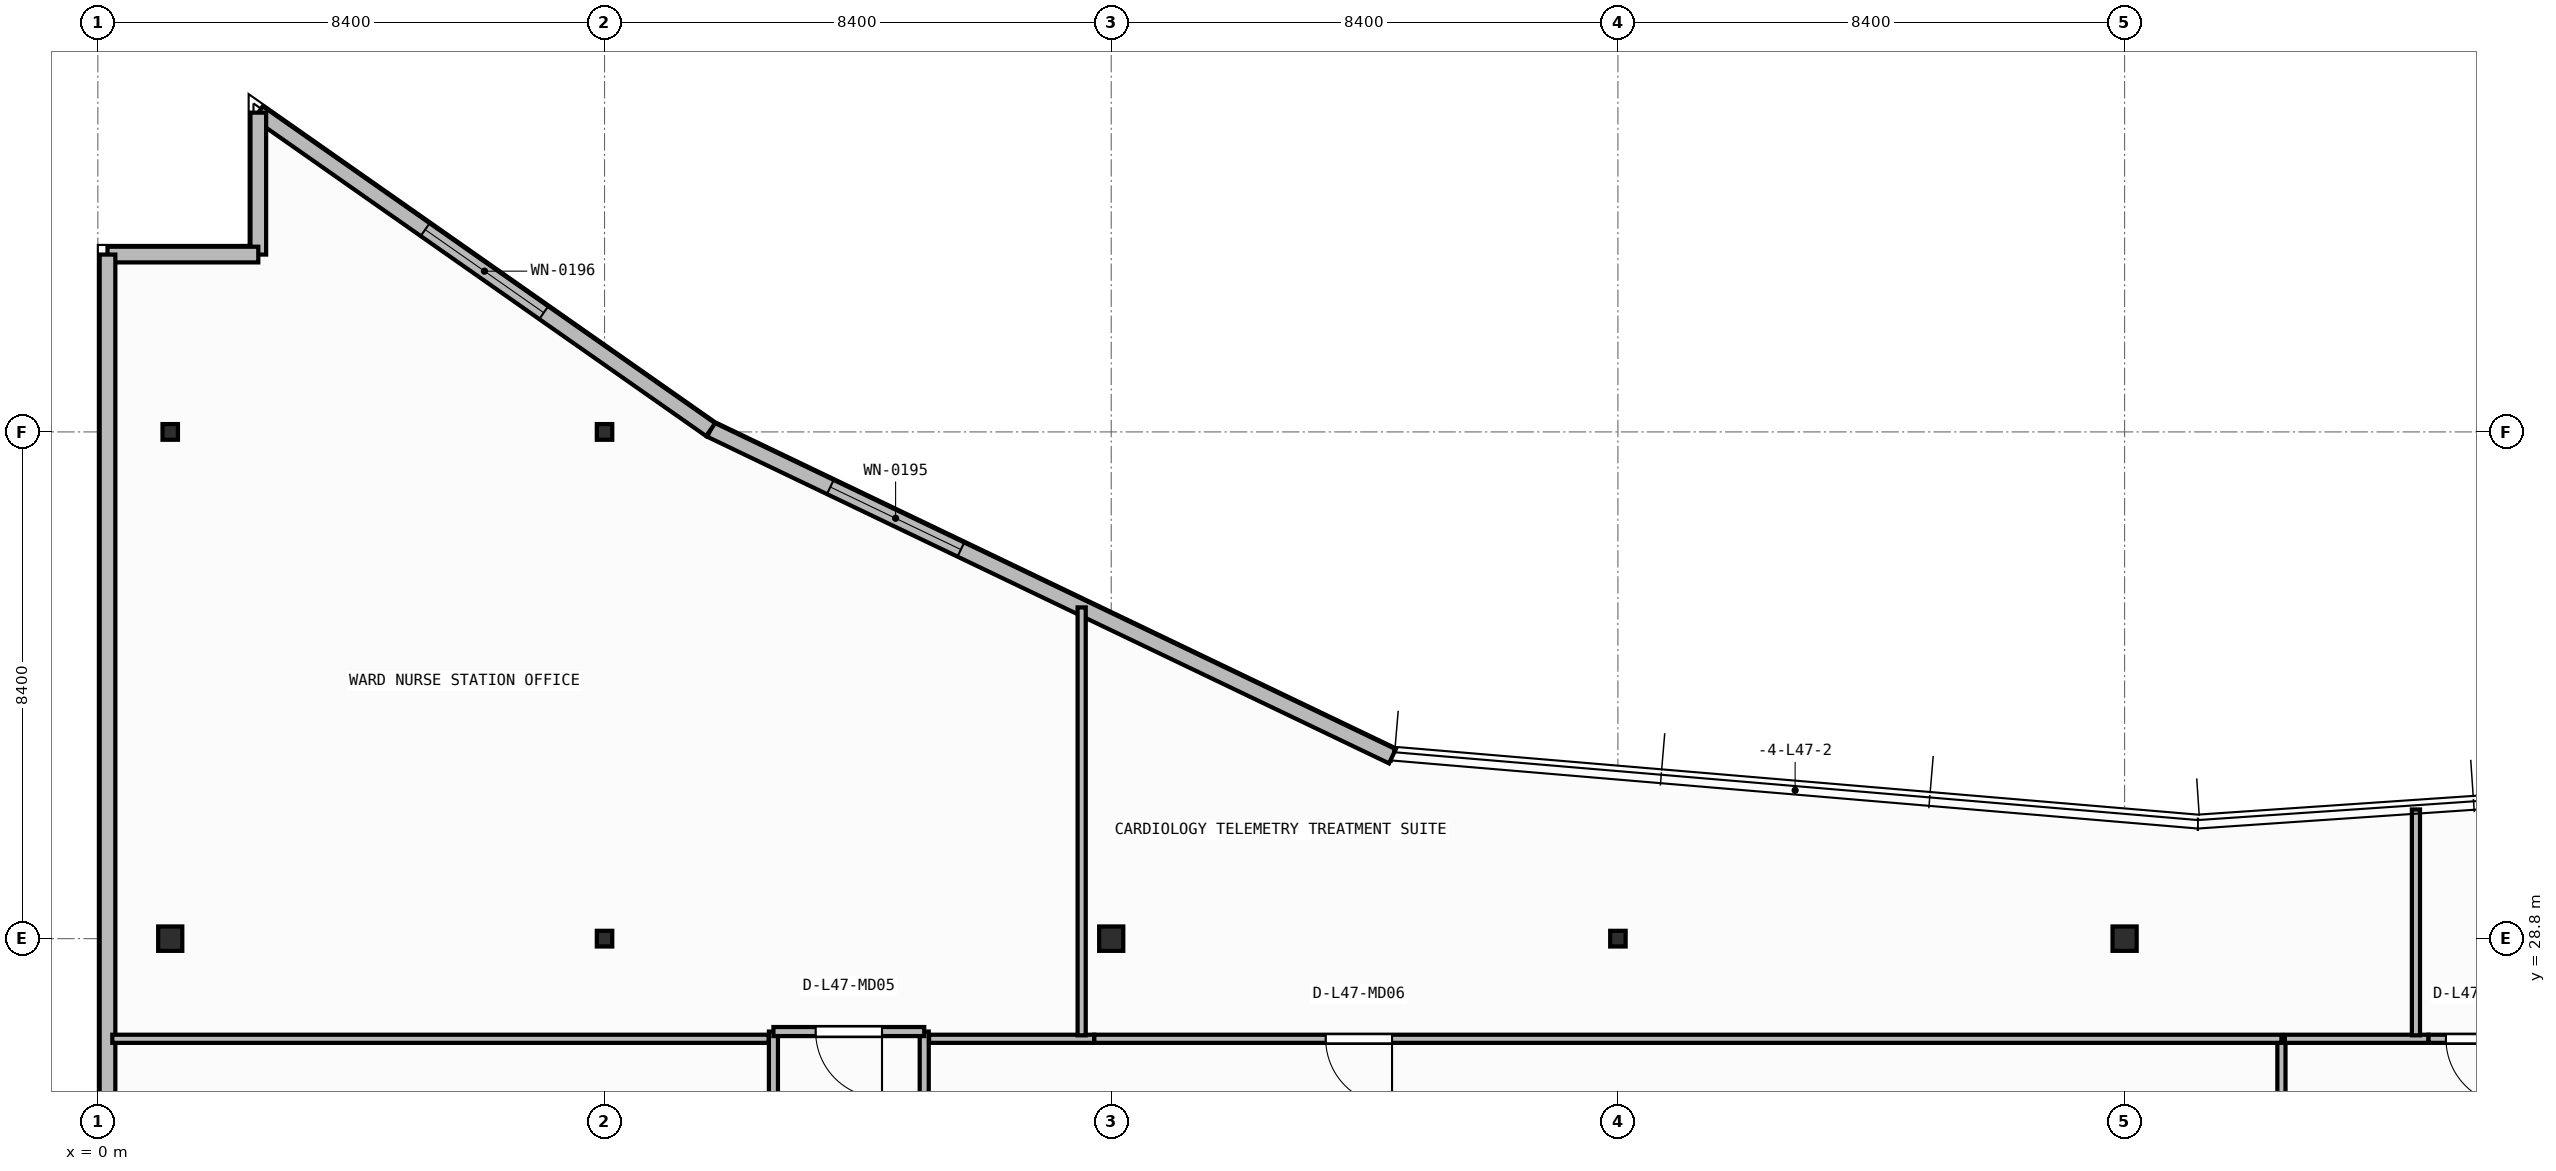
"""IFC4 building model, lengths in metres.
Left out: names, types, materials, properties, quantities, classifications, styles, units other than length and angle.
Written with IfcOpenShell. Run it as: python <this file> out.ifc"""

import sys

from ifc_helpers import new_model, si_unit, direction, frame, frame_2d, origin, origin_2d, place, context, subcontext, project, spatial, rectangle, i_section, extrude, element, fill, save


model = new_model("IFC4")
c1 = context("Model", 3, precision=1e-05, world=origin(), true_north=direction((0.0, 1.0)))
c2 = subcontext(c1, "Body", "Model", "MODEL_VIEW")
j1 = project(units=[si_unit("LENGTHUNIT", "METRE"), si_unit("PLANEANGLEUNIT", "RADIAN")], contexts=[c1])
p1 = place(None, origin())
s1 = spatial("IfcSite", under=j1, at=p1, CompositionType="ELEMENT")
p2 = place(p1, origin())
s2 = spatial("IfcBuilding", under=s1, at=p2, CompositionType="ELEMENT")
p3 = place(p2, frame((0.0, 0.0, 192.1)))
s3 = spatial("IfcBuildingStorey", under=s2, at=p3, CompositionType="ELEMENT", Elevation=192.1)
p4 = place(p3, frame((1.2, 28.8, 0.0), z_axis=(0.0, 0.0, 1.0), x_axis=(1.0, 0.0, 0.0)))
e1 = element("IfcColumn", 1, at=p4, inside=s3, PredefinedType="COLUMN", context=c2, shape_type="SweptSolid", body=[
    extrude(i_section(OverallWidth=0.4, OverallDepth=0.404, WebThickness=0.02, FlangeThickness=0.032, at=origin_2d()), origin(), (0.0, 0.0, 1.0), 3.95),
])
p5 = place(p3, frame((8.4, 28.8, 0.0), z_axis=(0.0, 0.0, 1.0), x_axis=(1.0, 0.0, 0.0)))
e2 = element("IfcColumn", 2, at=p5, inside=s3, PredefinedType="COLUMN", context=c2, shape_type="SweptSolid", body=[
    extrude(i_section(OverallWidth=0.256, OverallDepth=0.26, WebThickness=0.01, FlangeThickness=0.017, FilletRadius=0.013, at=origin_2d()), origin(), (0.0, 0.0, 1.0), 3.95),
])
p6 = place(p3, frame((16.8, 28.8, 0.0), z_axis=(0.0, 0.0, 1.0), x_axis=(1.0, 0.0, 0.0)))
e3 = element("IfcColumn", 3, at=p6, inside=s3, PredefinedType="COLUMN", context=c2, shape_type="SweptSolid", body=[
    extrude(i_section(OverallWidth=0.4, OverallDepth=0.404, WebThickness=0.02, FlangeThickness=0.032, at=origin_2d()), origin(), (0.0, 0.0, 1.0), 3.95),
])
p7 = place(p3, frame((25.2, 28.8, 0.0), z_axis=(0.0, 0.0, 1.0), x_axis=(1.0, 0.0, 0.0)))
e4 = element("IfcColumn", 4, at=p7, inside=s3, PredefinedType="COLUMN", context=c2, shape_type="SweptSolid", body=[
    extrude(i_section(OverallWidth=0.256, OverallDepth=0.26, WebThickness=0.01, FlangeThickness=0.017, FilletRadius=0.013, at=origin_2d()), origin(), (0.0, 0.0, 1.0), 3.95),
])
p8 = place(p3, frame((33.6, 28.8, 0.0), z_axis=(0.0, 0.0, 1.0), x_axis=(1.0, 0.0, 0.0)))
e5 = element("IfcColumn", 5, at=p8, inside=s3, PredefinedType="COLUMN", context=c2, shape_type="SweptSolid", body=[
    extrude(i_section(OverallWidth=0.4, OverallDepth=0.404, WebThickness=0.02, FlangeThickness=0.032, at=origin_2d()), origin(), (0.0, 0.0, 1.0), 3.95),
])
for number, where, z_axis, x_axis in (
    (6, (1.2, 37.2, 0.0), (0.0, 0.0, 1.0), (1.0, 0.0, 0.0)),
    (7, (8.4, 37.2, 0.0), (0.0, 0.0, 1.0), (1.0, 0.0, 0.0)),
):
    element("IfcColumn", number, at=place(p3, frame(where, z_axis=z_axis, x_axis=x_axis)), inside=s3, PredefinedType="COLUMN", context=c2, shape_type="SweptSolid", body=[
        extrude(i_section(OverallWidth=0.256, OverallDepth=0.26, WebThickness=0.01, FlangeThickness=0.017, FilletRadius=0.013, at=origin_2d()), origin(), (0.0, 0.0, 1.0), 3.95),
    ])
p9 = place(p3, frame((21.461, 31.823, 0.0), z_axis=(0.0, 0.0, 1.0), x_axis=(-0.901858094827, 0.432032379336, 0.0)))
e8 = element("IfcWall", 8, at=p9, inside=s3, PredefinedType="STANDARD", context=c2, shape_type="SweptSolid", body=[
    extrude(rectangle(XDim=12.532, YDim=0.26, at=frame_2d((6.266, 0.0))), origin(), (0.0, 0.0, 1.0), 3.71),
])
p10 = place(p9, frame((7.932, 0.0, 0.9)))
e9 = element("IfcOpeningElement", 9, at=p10, cuts=e8, PredefinedType="OPENING", context=c2, shape_type="SweptSolid", body=[
    extrude(rectangle(XDim=2.4, YDim=1.65, at=frame_2d((1.2, 0.825))), frame((0.0, 0.14, 0.0), z_axis=(0.0, -1.0, 0.0), x_axis=(1.0, 0.0, 0.0)), (0.0, 0.0, 1.0), 0.28),
])
p11 = place(p3, frame((10.159, 37.237, 0.0), z_axis=(0.0, 0.0, 1.0), x_axis=(-0.818933702389, 0.57388813465, 0.0)))
e10 = element("IfcWall", 10, at=p11, inside=s3, PredefinedType="STANDARD", context=c2, shape_type="SweptSolid", body=[
    extrude(rectangle(XDim=9.157, YDim=0.26, at=frame_2d((4.579, 0.0))), origin(), (0.0, 0.0, 1.0), 3.71),
])
p12 = place(p11, frame((3.378, 0.0, 0.9)))
e11 = element("IfcOpeningElement", 11, at=p12, cuts=e10, PredefinedType="OPENING", context=c2, shape_type="SweptSolid", body=[
    extrude(rectangle(XDim=2.4, YDim=1.65, at=frame_2d((1.2, 0.825))), frame((0.0, 0.14, 0.0), z_axis=(0.0, -1.0, 0.0), x_axis=(1.0, 0.0, 0.0)), (0.0, 0.0, 1.0), 0.28),
])
p13 = place(p3, frame((2.66, 42.492, 0.0), z_axis=(0.0, 0.0, 1.0), x_axis=(0.0, -1.0, 0.0)))
e12 = element("IfcWall", 12, at=p13, inside=s3, PredefinedType="STANDARD", context=c2, shape_type="SweptSolid", body=[
    extrude(rectangle(XDim=2.353, YDim=0.26, at=frame_2d((1.176, 0.0))), origin(), (0.0, 0.0, 1.0), 3.71),
])
p14 = place(p3, frame((2.66, 40.14, 0.0), z_axis=(0.0, 0.0, 1.0), x_axis=(-1.0, 0.0, 0.0)))
e13 = element("IfcWall", 13, at=p14, inside=s3, PredefinedType="STANDARD", context=c2, shape_type="SweptSolid", body=[
    extrude(rectangle(XDim=2.5, YDim=0.26, at=frame_2d((1.25, 0.0))), origin(), (0.0, 0.0, 1.0), 3.71),
])
p15 = place(p3, frame((0.16, 40.14, 0.0), z_axis=(0.0, 0.0, 1.0), x_axis=(0.0, -1.0, 0.0)))
e14 = element("IfcWall", 14, at=p15, inside=s3, PredefinedType="STANDARD", context=c2, shape_type="SweptSolid", body=[
    extrude(rectangle(XDim=37.48, YDim=0.26, at=frame_2d((18.74, 0.0))), origin(), (0.0, 0.0, 1.0), 3.71),
])
p16 = place(p15, frame((27.4, 0.0, 0.9)))
e15 = element("IfcOpeningElement", 15, at=p16, cuts=e14, PredefinedType="OPENING", context=c2, shape_type="SweptSolid", body=[
    extrude(rectangle(XDim=2.4, YDim=1.65, at=frame_2d((1.2, 0.825))), frame((0.0, 0.14, 0.0), z_axis=(0.0, -1.0, 0.0), x_axis=(1.0, 0.0, 0.0)), (0.0, 0.0, 1.0), 0.28),
])
p17 = place(p3, frame((11.2, 27.26, 0.0), z_axis=(0.0, 0.0, 1.0), x_axis=(0.0, -1.0, 0.0)))
e16 = element("IfcWall", 16, at=p17, inside=s3, PredefinedType="PARTITIONING", context=c2, shape_type="SweptSolid", body=[
    extrude(rectangle(XDim=6.592, YDim=0.15, at=frame_2d((3.296, 0.0))), origin(), (0.0, 0.0, 1.0), 3.71),
])
p18 = place(p17, frame((2.746, 0.0, 0.0)))
e17 = element("IfcOpeningElement", 17, at=p18, cuts=e16, PredefinedType="OPENING", context=c2, shape_type="SweptSolid", body=[
    extrude(rectangle(XDim=1.1, YDim=2.1, at=frame_2d((0.55, 1.05))), frame((0.0, 0.085, 0.0), z_axis=(0.0, -1.0, 0.0), x_axis=(1.0, 0.0, 0.0)), (0.0, 0.0, 1.0), 0.17),
])
p19 = place(p3, frame((13.7, 20.668, 0.0), z_axis=(0.0, 0.0, 1.0), x_axis=(0.0, 1.0, 0.0)))
e18 = element("IfcWall", 18, at=p19, inside=s3, PredefinedType="PARTITIONING", context=c2, shape_type="SweptSolid", body=[
    extrude(rectangle(XDim=6.592, YDim=0.15, at=frame_2d((3.296, 0.0))), origin(), (0.0, 0.0, 1.0), 3.71),
])
p20 = place(p19, frame((2.746, 0.0, 0.0)))
e19 = element("IfcOpeningElement", 19, at=p20, cuts=e18, PredefinedType="OPENING", context=c2, shape_type="SweptSolid", body=[
    extrude(rectangle(XDim=1.1, YDim=2.1, at=frame_2d((0.55, 1.05))), frame((0.0, 0.085, 0.0), z_axis=(0.0, -1.0, 0.0), x_axis=(1.0, 0.0, 0.0)), (0.0, 0.0, 1.0), 0.17),
])
p21 = place(p3, frame((13.7, 27.26, 0.0), z_axis=(0.0, 0.0, 1.0), x_axis=(-1.0, 0.0, 0.0)))
e20 = element("IfcWall", 20, at=p21, inside=s3, PredefinedType="PARTITIONING", context=c2, shape_type="SweptSolid", body=[
    extrude(rectangle(XDim=2.5, YDim=0.15, at=frame_2d((1.25, 0.0))), origin(), (0.0, 0.0, 1.0), 3.71),
])
p22 = place(p21, frame((0.7, 0.0, 0.0)))
e21 = element("IfcOpeningElement", 21, at=p22, cuts=e20, PredefinedType="OPENING", context=c2, shape_type="SweptSolid", body=[
    extrude(rectangle(XDim=1.1, YDim=2.1, at=frame_2d((0.55, 1.05))), frame((0.0, 0.085, 0.0), z_axis=(0.0, -1.0, 0.0), x_axis=(1.0, 0.0, 0.0)), (0.0, 0.0, 1.0), 0.17),
])
p23 = place(p3, frame((11.12, 27.14, 0.0), z_axis=(0.0, 0.0, 1.0), x_axis=(-1.0, 0.0, 0.0)))
e22 = element("IfcWall", 22, at=p23, inside=s3, PredefinedType="PARTITIONING", context=c2, shape_type="SweptSolid", body=[
    extrude(rectangle(XDim=10.88, YDim=0.135, at=frame_2d((5.44, 0.0))), origin(), (0.0, 0.0, 1.0), 3.71),
])
p24 = place(p3, frame((36.2, 20.498, 0.0), z_axis=(0.0, 0.0, 1.0), x_axis=(0.0, 1.0, 0.0)))
e23 = element("IfcWall", 23, at=p24, inside=s3, PredefinedType="PARTITIONING", context=c2, shape_type="SweptSolid", body=[
    extrude(rectangle(XDim=6.642, YDim=0.135, at=frame_2d((3.321, 0.0))), origin(), (0.0, 0.0, 1.0), 3.71),
])
p25 = place(p24, frame((2.771, 0.0, 0.0)))
e24 = element("IfcOpeningElement", 24, at=p25, cuts=e23, PredefinedType="OPENING", context=c2, shape_type="SweptSolid", body=[
    extrude(rectangle(XDim=1.1, YDim=2.1, at=frame_2d((0.55, 1.05))), frame((0.0, 0.077, 0.0), z_axis=(0.0, -1.0, 0.0), x_axis=(1.0, 0.0, 0.0)), (0.0, 0.0, 1.0), 0.155),
])
p26 = place(p3, frame((16.518, 27.14, 0.0), z_axis=(0.0, 0.0, 1.0), x_axis=(-1.0, 0.0, 0.0)))
e25 = element("IfcWall", 25, at=p26, inside=s3, PredefinedType="PARTITIONING", context=c2, shape_type="SweptSolid", body=[
    extrude(rectangle(XDim=2.738, YDim=0.135, at=frame_2d((1.369, 0.0))), origin(), (0.0, 0.0, 1.0), 3.71),
])
p27 = place(p3, frame((36.2, 27.14, 0.0), z_axis=(0.0, 0.0, 1.0), x_axis=(-1.0, 0.0, 0.0)))
e26 = element("IfcWall", 26, at=p27, inside=s3, PredefinedType="PARTITIONING", context=c2, shape_type="SweptSolid", body=[
    extrude(rectangle(XDim=19.68, YDim=0.135, at=frame_2d((9.84, 0.0))), origin(), (0.0, 0.0, 1.0), 3.71),
])
p28 = place(p27, frame((14.744, 0.0, 0.0)))
e27 = element("IfcOpeningElement", 27, at=p28, cuts=e26, PredefinedType="OPENING", context=c2, shape_type="SweptSolid", body=[
    extrude(rectangle(XDim=1.1, YDim=2.1, at=frame_2d((0.55, 1.05))), frame((0.0, 0.077, 0.0), z_axis=(0.0, -1.0, 0.0), x_axis=(1.0, 0.0, 0.0)), (0.0, 0.0, 1.0), 0.155),
])
p29 = place(p3, frame((38.637, 27.14, 0.0), z_axis=(0.0, 0.0, 1.0), x_axis=(-1.0, 0.0, 0.0)))
e28 = element("IfcWall", 28, at=p29, inside=s3, PredefinedType="PARTITIONING", context=c2, shape_type="SweptSolid", body=[
    extrude(rectangle(XDim=2.38, YDim=0.135, at=frame_2d((1.19, 0.0))), origin(), (0.0, 0.0, 1.0), 3.71),
])
p30 = place(p3, frame((43.66, 27.14, 0.0), z_axis=(0.0, 0.0, 1.0), x_axis=(-1.0, 0.0, 0.0)))
e29 = element("IfcWall", 29, at=p30, inside=s3, PredefinedType="PARTITIONING", context=c2, shape_type="SweptSolid", body=[
    extrude(rectangle(XDim=5.021, YDim=0.135, at=frame_2d((2.51, 0.0))), origin(), (0.0, 0.0, 1.0), 3.71),
])
p31 = place(p30, frame((3.633, 0.0, 0.0)))
e30 = element("IfcOpeningElement", 30, at=p31, cuts=e29, PredefinedType="OPENING", context=c2, shape_type="SweptSolid", body=[
    extrude(rectangle(XDim=1.1, YDim=2.1, at=frame_2d((0.55, 1.05))), frame((0.0, 0.077, 0.0), z_axis=(0.0, -1.0, 0.0), x_axis=(1.0, 0.0, 0.0)), (0.0, 0.0, 1.0), 0.155),
])
p32 = place(p3, frame((16.31, 27.198, 0.0), z_axis=(0.0, 0.0, 1.0), x_axis=(0.0, 1.0, 0.0)))
e31 = element("IfcWall", 31, at=p32, inside=s3, PredefinedType="PARTITIONING", context=c2, shape_type="SweptSolid", body=[
    extrude(rectangle(XDim=7.093, YDim=0.135, at=frame_2d((3.547, 0.0))), origin(), (0.0, 0.0, 1.0), 3.152),
])
p33 = place(p3, frame((38.43, 27.198, 0.0), z_axis=(0.0, 0.0, 1.0), x_axis=(0.0, 1.0, 0.0)))
e32 = element("IfcWall", 32, at=p33, inside=s3, PredefinedType="PARTITIONING", context=c2, shape_type="SweptSolid", body=[
    extrude(rectangle(XDim=3.744, YDim=0.135, at=frame_2d((1.872, 0.0))), origin(), (0.0, 0.0, 1.0), 3.71),
])
p34 = place(p10, origin())
e33 = element("IfcWindow", 33, at=p34, inside=s3, PartitioningType="SINGLE_PANEL", PredefinedType="WINDOW", context=c2, shape_type="SweptSolid", body=[
    extrude(rectangle(XDim=2.4, YDim=1.65, at=frame_2d((1.2, 0.825))), frame((0.0, 0.03, 0.0), z_axis=(0.0, -1.0, 0.0), x_axis=(1.0, 0.0, 0.0)), (0.0, 0.0, 1.0), 0.06),
])
fill(e9, e33)
p35 = place(p12, origin())
e34 = element("IfcWindow", 34, at=p35, inside=s3, PartitioningType="SINGLE_PANEL", PredefinedType="WINDOW", context=c2, shape_type="SweptSolid", body=[
    extrude(rectangle(XDim=2.4, YDim=1.65, at=frame_2d((1.2, 0.825))), frame((0.0, 0.03, 0.0), z_axis=(0.0, -1.0, 0.0), x_axis=(1.0, 0.0, 0.0)), (0.0, 0.0, 1.0), 0.06),
])
fill(e11, e34)
p36 = place(p22, origin())
e35 = element("IfcDoor", 35, at=p36, inside=s3, OperationType="SINGLE_SWING_LEFT", PredefinedType="DOOR", context=c2, shape_type="SweptSolid", body=[
    extrude(rectangle(XDim=1.1, YDim=2.1, at=frame_2d((0.55, 1.05))), frame((0.0, 0.025, 0.0), z_axis=(0.0, -1.0, 0.0), x_axis=(1.0, 0.0, 0.0)), (0.0, 0.0, 1.0), 0.05),
])
fill(e21, e35)
p37 = place(p28, origin())
e36 = element("IfcDoor", 36, at=p37, inside=s3, OperationType="SINGLE_SWING_LEFT", PredefinedType="DOOR", context=c2, shape_type="SweptSolid", body=[
    extrude(rectangle(XDim=1.1, YDim=2.1, at=frame_2d((0.55, 1.05))), frame((0.0, 0.025, 0.0), z_axis=(0.0, -1.0, 0.0), x_axis=(1.0, 0.0, 0.0)), (0.0, 0.0, 1.0), 0.05),
])
fill(e27, e36)
p38 = place(p31, origin())
e37 = element("IfcDoor", 37, at=p38, inside=s3, OperationType="SINGLE_SWING_LEFT", PredefinedType="DOOR", context=c2, shape_type="SweptSolid", body=[
    extrude(rectangle(XDim=1.1, YDim=2.1, at=frame_2d((0.55, 1.05))), frame((0.0, 0.025, 0.0), z_axis=(0.0, -1.0, 0.0), x_axis=(1.0, 0.0, 0.0)), (0.0, 0.0, 1.0), 0.05),
])
fill(e30, e37)
save(model, sys.argv[1])
